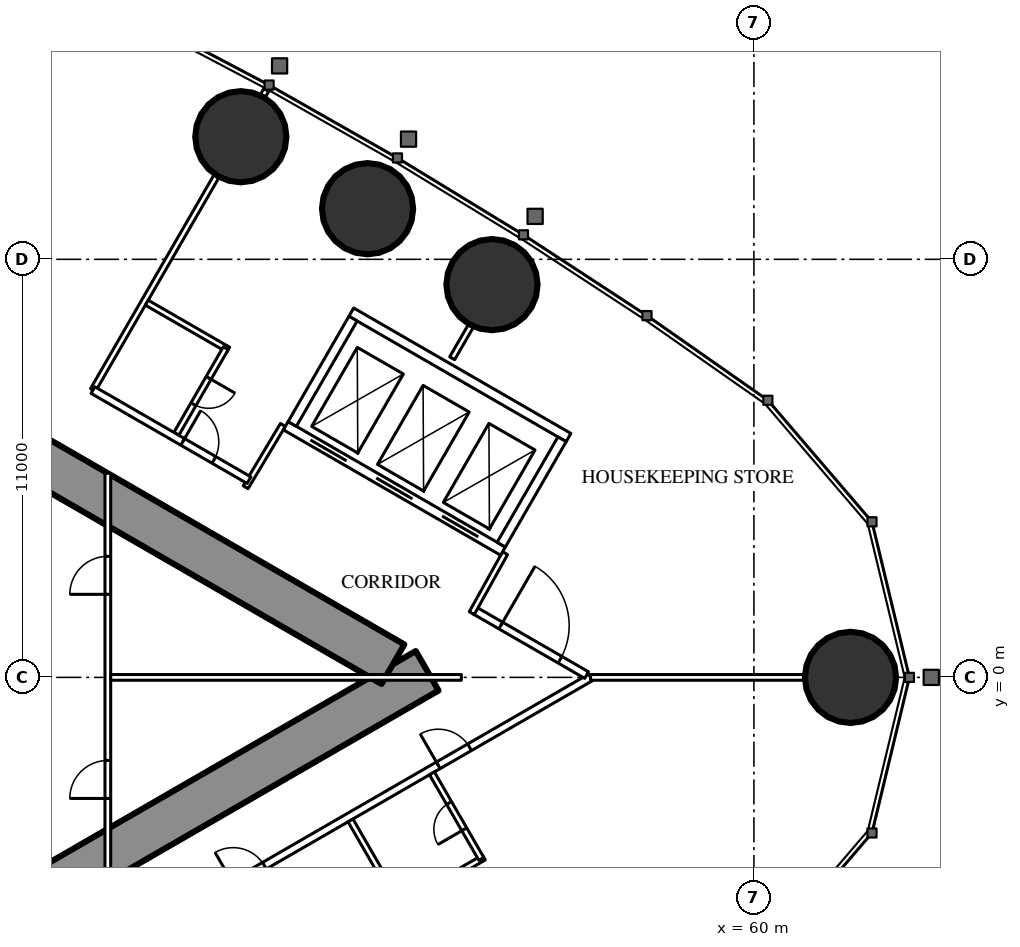
"""IFC4 building model, lengths in metres.
Left out: names, types, materials, properties, quantities, classifications, styles, units other than length and angle.
Written with IfcOpenShell. Run it as: python <this file> out.ifc"""

import sys

from ifc_helpers import new_model, si_unit, direction, frame, frame_2d, origin, origin_2d, place, context, subcontext, project, spatial, rectangle, circle, extrude, element, fill, save


model = new_model("IFC4")
c1 = context("Model", 3, precision=1e-05, world=origin(), true_north=direction((0.0, 1.0)))
c2 = subcontext(c1, "Body", "Model", "MODEL_VIEW")
j1 = project(units=[si_unit("LENGTHUNIT", "METRE"), si_unit("PLANEANGLEUNIT", "RADIAN")], contexts=[c1])
p1 = place(None, origin())
s1 = spatial("IfcSite", under=j1, at=p1, CompositionType="ELEMENT")
p2 = place(p1, origin())
s2 = spatial("IfcBuilding", under=s1, at=p2, CompositionType="ELEMENT")
p3 = place(p2, frame((0.0, 0.0, 236.9)))
s3 = spatial("IfcBuildingStorey", under=s2, at=p3, CompositionType="ELEMENT", Elevation=236.9)
for number, where, z_axis, x_axis in (
    (1, (62.542, 0.0, 0.0), (0.0, 0.0, 1.0), (1.0, 0.0, 0.0)),
    (2, (53.108, 10.334, 0.0), (0.0, 0.0, 1.0), (1.0, 0.0, 0.0)),
    (3, (49.834, 12.332, 0.0), (0.0, 0.0, 1.0), (1.0, 0.0, 0.0)),
    (4, (46.499, 14.226, 0.0), (0.0, 0.0, 1.0), (1.0, 0.0, 0.0)),
):
    element("IfcColumn", number, at=place(p3, frame(where, z_axis=z_axis, x_axis=x_axis)), inside=s3, PredefinedType="COLUMN", context=c2, shape_type="SweptSolid", body=[
        extrude(circle(Radius=1.2, at=origin_2d()), origin(), (0.0, 0.0, 1.0), 3.6),
    ])
p4 = place(p3, frame((27.2, -13.8, 0.0), z_axis=(0.0, 0.0, 1.0), x_axis=(0.866027159892, 0.499996958321, 0.0)))
e5 = element("IfcWall", 5, at=p4, inside=s3, PredefinedType="SHEAR", context=c2, shape_type="SweptSolid", body=[
    extrude(rectangle(XDim=27.947, YDim=1.2, at=frame_2d((13.973, 0.0))), origin(), (0.0, 0.0, 1.0), 3.6),
])
p5 = place(p4, frame((4.6, 0.0, 0.0)))
e6 = element("IfcOpeningElement", 6, at=p5, cuts=e5, PredefinedType="OPENING", context=c2, shape_type="SweptSolid", body=[
    extrude(rectangle(XDim=1.0, YDim=2.2, at=frame_2d((0.5, 1.1))), frame((0.0, 0.61, 0.0), z_axis=(0.0, -1.0, 0.0), x_axis=(1.0, 0.0, 0.0)), (0.0, 0.0, 1.0), 1.22),
])
p6 = place(p4, frame((13.395, 0.0, 0.0)))
e7 = element("IfcOpeningElement", 7, at=p6, cuts=e5, PredefinedType="OPENING", context=c2, shape_type="SweptSolid", body=[
    extrude(rectangle(XDim=1.8, YDim=2.2, at=frame_2d((0.9, 1.1))), frame((0.0, 0.61, 0.0), z_axis=(0.0, -1.0, 0.0), x_axis=(1.0, 0.0, 0.0)), (0.0, 0.0, 1.0), 1.22),
])
p7 = place(p3, frame((27.2, 13.8, 0.0), z_axis=(0.0, 0.0, 1.0), x_axis=(0.866024515034, -0.500001539357, 0.0)))
e8 = element("IfcWall", 8, at=p7, inside=s3, PredefinedType="SHEAR", context=c2, shape_type="SweptSolid", body=[
    extrude(rectangle(XDim=26.907, YDim=1.2, at=frame_2d((13.454, 0.0))), origin(), (0.0, 0.0, 1.0), 3.6),
])
p8 = place(p7, frame((4.6, 0.0, 0.0)))
e9 = element("IfcOpeningElement", 9, at=p8, cuts=e8, PredefinedType="OPENING", context=c2, shape_type="SweptSolid", body=[
    extrude(rectangle(XDim=1.0, YDim=2.2, at=frame_2d((0.5, 1.1))), frame((0.0, 0.61, 0.0), z_axis=(0.0, -1.0, 0.0), x_axis=(1.0, 0.0, 0.0)), (0.0, 0.0, 1.0), 1.22),
])
p9 = place(p7, frame((13.395, 0.0, 0.0)))
e10 = element("IfcOpeningElement", 10, at=p9, cuts=e8, PredefinedType="OPENING", context=c2, shape_type="SweptSolid", body=[
    extrude(rectangle(XDim=1.8, YDim=2.2, at=frame_2d((0.9, 1.1))), frame((0.0, 0.61, 0.0), z_axis=(0.0, -1.0, 0.0), x_axis=(1.0, 0.0, 0.0)), (0.0, 0.0, 1.0), 1.22),
])
p10 = place(p3, frame((28.959, -15.44, 0.0), z_axis=(0.0, 0.0, 1.0), x_axis=(0.866025227435, 0.500000305447, 0.0)))
e11 = element("IfcWall", 11, at=p10, inside=s3, PredefinedType="PARTITIONING", context=c2, shape_type="SweptSolid", body=[
    extrude(rectangle(XDim=30.88, YDim=0.2, at=frame_2d((15.44, 0.0))), origin(), (0.0, 0.0, 1.0), 3.35),
])
p11 = place(p10, frame((1.494, 0.0, 0.0)))
e12 = element("IfcOpeningElement", 12, at=p11, cuts=e11, PredefinedType="OPENING", context=c2, shape_type="SweptSolid", body=[
    extrude(rectangle(XDim=1.8, YDim=2.03, at=frame_2d((0.9, 1.015))), frame((0.0, 0.11, 0.0), z_axis=(0.0, -1.0, 0.0), x_axis=(1.0, 0.0, 0.0)), (0.0, 0.0, 1.0), 0.22),
])
p12 = place(p10, frame((7.687, 0.0, 0.0)))
e13 = element("IfcOpeningElement", 13, at=p12, cuts=e11, PredefinedType="OPENING", context=c2, shape_type="SweptSolid", body=[
    extrude(rectangle(XDim=1.0, YDim=2.2, at=frame_2d((0.5, 1.1))), frame((0.0, 0.11, 0.0), z_axis=(0.0, -1.0, 0.0), x_axis=(1.0, 0.0, 0.0)), (0.0, 0.0, 1.0), 0.22),
])
p13 = place(p10, frame((16.137, 0.0, 0.0)))
e14 = element("IfcOpeningElement", 14, at=p13, cuts=e11, PredefinedType="OPENING", context=c2, shape_type="SweptSolid", body=[
    extrude(rectangle(XDim=0.95, YDim=2.2, at=frame_2d((0.475, 1.1))), frame((0.0, 0.11, 0.0), z_axis=(0.0, -1.0, 0.0), x_axis=(1.0, 0.0, 0.0)), (0.0, 0.0, 1.0), 0.22),
])
p14 = place(p10, frame((20.021, 0.0, 0.0)))
e15 = element("IfcOpeningElement", 15, at=p14, cuts=e11, PredefinedType="OPENING", context=c2, shape_type="SweptSolid", body=[
    extrude(rectangle(XDim=0.95, YDim=2.2, at=frame_2d((0.475, 1.1))), frame((0.0, 0.11, 0.0), z_axis=(0.0, -1.0, 0.0), x_axis=(1.0, 0.0, 0.0)), (0.0, 0.0, 1.0), 0.22),
])
p15 = place(p10, frame((26.253, 0.0, 0.0)))
e16 = element("IfcOpeningElement", 16, at=p15, cuts=e11, PredefinedType="OPENING", context=c2, shape_type="SweptSolid", body=[
    extrude(rectangle(XDim=0.95, YDim=2.2, at=frame_2d((0.475, 1.1))), frame((0.0, 0.11, 0.0), z_axis=(0.0, -1.0, 0.0), x_axis=(1.0, 0.0, 0.0)), (0.0, 0.0, 1.0), 0.22),
])
p16 = place(p3, frame((49.385, -3.763, 0.0), z_axis=(0.0, 0.0, 1.0), x_axis=(0.499999447814, -0.866025722589, 0.0)))
e17 = element("IfcWall", 17, at=p16, inside=s3, PredefinedType="PARTITIONING", context=c2, shape_type="SweptSolid", body=[
    extrude(rectangle(XDim=6.333, YDim=0.15, at=frame_2d((3.166, 0.0))), origin(), (0.0, 0.0, 1.0), 2.45),
])
p17 = place(p3, frame((42.61, 7.559, 0.0), z_axis=(0.0, 0.0, 1.0), x_axis=(0.500014058812, 0.866017286774, 0.0)))
e18 = element("IfcWall", 18, at=p17, inside=s3, PredefinedType="PARTITIONING", context=c2, shape_type="SweptSolid", body=[
    extrude(rectangle(XDim=6.498, YDim=0.15, at=frame_2d((3.249, 0.0))), origin(), (0.0, 0.0, 1.0), 2.45),
])
p18 = place(p3, frame((47.079, 15.3, 0.0), z_axis=(0.0, 0.0, 1.0), x_axis=(0.499212083968, 0.866479829667, 0.0)))
e19 = element("IfcWall", 19, at=p18, inside=s3, PredefinedType="PARTITIONING", context=c2, shape_type="SweptSolid", body=[
    extrude(rectangle(XDim=0.179, YDim=0.15, at=frame_2d((0.09, 0.0))), origin(), (0.0, 0.0, 1.0), 2.45),
])
p19 = place(p3, frame((55.702, 0.0, 0.0), z_axis=(0.0, 0.0, 1.0), x_axis=(1.0, 0.0, 0.0)))
e20 = element("IfcWall", 20, at=p19, inside=s3, PredefinedType="PARTITIONING", context=c2, shape_type="SweptSolid", body=[
    extrude(rectangle(XDim=5.619, YDim=0.15, at=frame_2d((2.81, 0.0))), origin(), (0.0, 0.0, 1.0), 2.45),
])
p20 = place(p3, frame((52.06, 8.396, 0.0), z_axis=(0.0, 0.0, 1.0), x_axis=(0.500095379624, 0.865970329329, 0.0)))
e21 = element("IfcWall", 21, at=p20, inside=s3, PredefinedType="PARTITIONING", context=c2, shape_type="SweptSolid", body=[
    extrude(rectangle(XDim=0.982, YDim=0.15, at=frame_2d((0.491, 0.0))), origin(), (0.0, 0.0, 1.0), 3.35),
])
p21 = place(p3, frame((52.639, 1.769, 0.0), z_axis=(0.0, 0.0, 1.0), x_axis=(0.866027340901, -0.4999966448, 0.0)))
e22 = element("IfcWall", 22, at=p21, inside=s3, PredefinedType="PARTITIONING", context=c2, shape_type="SweptSolid", body=[
    extrude(rectangle(XDim=3.417, YDim=0.2, at=frame_2d((1.708, 0.0))), origin(), (0.0, 0.0, 1.0), 3.35),
])
p22 = place(p21, frame((0.809, 0.0, 0.0)))
e23 = element("IfcOpeningElement", 23, at=p22, cuts=e22, PredefinedType="OPENING", context=c2, shape_type="SweptSolid", body=[
    extrude(rectangle(XDim=1.8, YDim=2.2, at=frame_2d((0.9, 1.1))), frame((0.0, 0.11, 0.0), z_axis=(0.0, -1.0, 0.0), x_axis=(1.0, 0.0, 0.0)), (0.0, 0.0, 1.0), 0.22),
])
p23 = place(p3, frame((47.606, 6.642, 0.0), z_axis=(0.0, 0.0, 1.0), x_axis=(-0.51353662755, -0.858067673418, 0.0)))
e24 = element("IfcWall", 24, at=p23, inside=s3, PredefinedType="PARTITIONING", context=c2, shape_type="SweptSolid", body=[
    extrude(rectangle(XDim=1.91, YDim=0.15, at=frame_2d((0.955, 0.0))), origin(), (0.0, 0.0, 1.0), 3.35),
])
p24 = place(p3, frame((52.576, 1.689, 0.0), z_axis=(0.0, 0.0, 1.0), x_axis=(0.485424724123, 0.874278466629, 0.0)))
e25 = element("IfcWall", 25, at=p24, inside=s3, PredefinedType="PARTITIONING", context=c2, shape_type="SweptSolid", body=[
    extrude(rectangle(XDim=1.805, YDim=0.15, at=frame_2d((0.903, 0.0))), origin(), (0.0, 0.0, 1.0), 3.35),
])
p25 = place(p3, frame((50.75, -5.977, 0.0), z_axis=(0.0, 0.0, 1.0), x_axis=(0.866031185235, 0.4999899861, 0.0)))
e26 = element("IfcWall", 26, at=p25, inside=s3, PredefinedType="PARTITIONING", context=c2, shape_type="SweptSolid", body=[
    extrude(rectangle(XDim=2.475, YDim=0.15, at=frame_2d((1.238, 0.0))), origin(), (0.0, 0.0, 1.0), 3.35),
])
p26 = place(p3, frame((51.529, -2.525, 0.0), z_axis=(0.0, 0.0, 1.0), x_axis=(0.500006934395, -0.866021400173, 0.0)))
e27 = element("IfcWall", 27, at=p26, inside=s3, PredefinedType="PARTITIONING", context=c2, shape_type="SweptSolid", body=[
    extrude(rectangle(XDim=2.6, YDim=0.15, at=frame_2d((1.3, 0.0))), origin(), (0.0, 0.0, 1.0), 3.35),
])
p27 = place(p26, frame((0.9, 0.0, 0.0)))
e28 = element("IfcOpeningElement", 28, at=p27, cuts=e27, PredefinedType="OPENING", context=c2, shape_type="SweptSolid", body=[
    extrude(rectangle(XDim=0.8, YDim=2.2, at=frame_2d((0.4, 1.1))), frame((0.0, 0.085, 0.0), z_axis=(0.0, -1.0, 0.0), x_axis=(1.0, 0.0, 0.0)), (0.0, 0.0, 1.0), 0.17),
])
p28 = place(p3, frame((44.025, 9.86, 0.0), z_axis=(0.0, 0.0, 1.0), x_axis=(0.866006523861, -0.500032699561, 0.0)))
e29 = element("IfcWall", 29, at=p28, inside=s3, PredefinedType="PARTITIONING", context=c2, shape_type="SweptSolid", body=[
    extrude(rectangle(XDim=2.475, YDim=0.15, at=frame_2d((1.237, 0.0))), origin(), (0.0, 0.0, 1.0), 3.35),
])
p29 = place(p3, frame((44.803, 6.408, 0.0), z_axis=(0.0, 0.0, 1.0), x_axis=(0.500047596559, 0.865997922154, 0.0)))
e30 = element("IfcWall", 30, at=p29, inside=s3, PredefinedType="PARTITIONING", context=c2, shape_type="SweptSolid", body=[
    extrude(rectangle(XDim=2.6, YDim=0.15, at=frame_2d((1.3, 0.0))), origin(), (0.0, 0.0, 1.0), 3.35),
])
p30 = place(p29, frame((0.9, 0.0, 0.0)))
e31 = element("IfcOpeningElement", 31, at=p30, cuts=e30, PredefinedType="OPENING", context=c2, shape_type="SweptSolid", body=[
    extrude(rectangle(XDim=0.8, YDim=2.2, at=frame_2d((0.4, 1.1))), frame((0.0, 0.085, 0.0), z_axis=(0.0, -1.0, 0.0), x_axis=(1.0, 0.0, 0.0)), (0.0, 0.0, 1.0), 0.17),
])
p31 = place(p3, frame((42.61, 7.559, 0.0), z_axis=(0.0, 0.0, 1.0), x_axis=(0.866032081755, -0.499988433238, 0.0)))
e32 = element("IfcWall", 32, at=p31, inside=s3, PredefinedType="PARTITIONING", context=c2, shape_type="SweptSolid", body=[
    extrude(rectangle(XDim=4.741, YDim=0.2, at=frame_2d((2.37, 0.0))), origin(), (0.0, 0.0, 1.0), 3.35),
])
p32 = place(p31, frame((2.725, 0.0, 0.0)))
e33 = element("IfcOpeningElement", 33, at=p32, cuts=e32, PredefinedType="OPENING", context=c2, shape_type="SweptSolid", body=[
    extrude(rectangle(XDim=0.95, YDim=2.2, at=frame_2d((0.475, 1.1))), frame((0.0, 0.11, 0.0), z_axis=(0.0, -1.0, 0.0), x_axis=(1.0, 0.0, 0.0)), (0.0, 0.0, 1.0), 0.22),
])
p33 = place(p3, frame((43.0, -5.371, 0.0), z_axis=(0.0, 0.0, 1.0), x_axis=(0.0, 1.0, 0.0)))
e34 = element("IfcWall", 34, at=p33, inside=s3, PredefinedType="PARTITIONING", context=c2, shape_type="SweptSolid", body=[
    extrude(rectangle(XDim=10.741, YDim=0.15, at=frame_2d((5.371, 0.0))), origin(), (0.0, 0.0, 1.0), 3.35),
])
p34 = place(p33, frame((2.185, 0.0, 0.0)))
e35 = element("IfcOpeningElement", 35, at=p34, cuts=e34, PredefinedType="OPENING", context=c2, shape_type="SweptSolid", body=[
    extrude(rectangle(XDim=1.0, YDim=2.2, at=frame_2d((0.5, 1.1))), frame((0.0, 0.085, 0.0), z_axis=(0.0, -1.0, 0.0), x_axis=(1.0, 0.0, 0.0)), (0.0, 0.0, 1.0), 0.17),
])
p35 = place(p33, frame((7.556, 0.0, 0.0)))
e36 = element("IfcOpeningElement", 36, at=p35, cuts=e34, PredefinedType="OPENING", context=c2, shape_type="SweptSolid", body=[
    extrude(rectangle(XDim=1.0, YDim=2.2, at=frame_2d((0.5, 1.1))), frame((0.0, 0.085, 0.0), z_axis=(0.0, -1.0, 0.0), x_axis=(1.0, 0.0, 0.0)), (0.0, 0.0, 1.0), 0.17),
])
p36 = place(p3, frame((43.075, 0.0, 0.0), z_axis=(0.0, 0.0, 1.0), x_axis=(1.0, 0.0, 0.0)))
e37 = element("IfcWall", 37, at=p36, inside=s3, PredefinedType="PARTITIONING", context=c2, shape_type="SweptSolid", body=[
    extrude(rectangle(XDim=9.227, YDim=0.15, at=frame_2d((4.614, 0.0))), origin(), (0.0, 0.0, 1.0), 2.45),
])
p37 = place(p3, frame((47.681, 6.622, 0.0), z_axis=(0.0, 0.0, 1.0), x_axis=(0.86603344179, -0.499986077507, 0.0)))
e38 = element("IfcWall", 38, at=p37, inside=s3, PredefinedType="PARTITIONING", context=c2, shape_type="SweptSolid", body=[
    extrude(rectangle(XDim=6.6, YDim=0.25, at=frame_2d((3.3, 0.0))), origin(), (0.0, 0.0, 1.0), 3.35),
])
p38 = place(p37, frame((0.75, 0.0, 0.0)))
e39 = element("IfcOpeningElement", 39, at=p38, cuts=e38, PredefinedType="OPENING", context=c2, shape_type="SweptSolid", body=[
    extrude(rectangle(XDim=1.1, YDim=2.2, at=frame_2d((0.55, 1.1))), frame((0.0, 0.135, 0.0), z_axis=(0.0, -1.0, 0.0), x_axis=(1.0, 0.0, 0.0)), (0.0, 0.0, 1.0), 0.27),
])
p39 = place(p37, frame((2.75, 0.0, 0.0)))
e40 = element("IfcOpeningElement", 40, at=p39, cuts=e38, PredefinedType="OPENING", context=c2, shape_type="SweptSolid", body=[
    extrude(rectangle(XDim=1.1, YDim=2.2, at=frame_2d((0.55, 1.1))), frame((0.0, 0.135, 0.0), z_axis=(0.0, -1.0, 0.0), x_axis=(1.0, 0.0, 0.0)), (0.0, 0.0, 1.0), 0.27),
])
p40 = place(p37, frame((4.75, 0.0, 0.0)))
e41 = element("IfcOpeningElement", 41, at=p40, cuts=e38, PredefinedType="OPENING", context=c2, shape_type="SweptSolid", body=[
    extrude(rectangle(XDim=1.1, YDim=2.2, at=frame_2d((0.55, 1.1))), frame((0.0, 0.135, 0.0), z_axis=(0.0, -1.0, 0.0), x_axis=(1.0, 0.0, 0.0)), (0.0, 0.0, 1.0), 0.27),
])
p41 = place(p3, frame((49.406, 9.611, 0.0), z_axis=(0.0, 0.0, 1.0), x_axis=(0.86603344179, -0.499986077507, 0.0)))
e42 = element("IfcWall", 42, at=p41, inside=s3, PredefinedType="PARTITIONING", context=c2, shape_type="SweptSolid", body=[
    extrude(rectangle(XDim=6.6, YDim=0.25, at=frame_2d((3.3, 0.0))), origin(), (0.0, 0.0, 1.0), 3.35),
])
p42 = place(p3, frame((47.852, 6.668, 0.0), z_axis=(0.0, 0.0, 1.0), x_axis=(0.499929347863, 0.866066190972, 0.0)))
e43 = element("IfcWall", 43, at=p42, inside=s3, PredefinedType="PARTITIONING", context=c2, shape_type="SweptSolid", body=[
    extrude(rectangle(XDim=3.201, YDim=0.25, at=frame_2d((1.6, 0.0))), origin(), (0.0, 0.0, 1.0), 3.35),
])
p43 = place(p3, frame((53.352, 3.493, 0.0), z_axis=(0.0, 0.0, 1.0), x_axis=(0.499872130319, 0.866099216793, 0.0)))
e44 = element("IfcWall", 44, at=p43, inside=s3, PredefinedType="PARTITIONING", context=c2, shape_type="SweptSolid", body=[
    extrude(rectangle(XDim=3.2, YDim=0.25, at=frame_2d((1.6, 0.0))), origin(), (0.0, 0.0, 1.0), 3.35),
])
p44 = place(p14, origin())
e45 = element("IfcDoor", 45, at=p44, inside=s3, OperationType="SINGLE_SWING_LEFT", PredefinedType="DOOR", context=c2, shape_type="SweptSolid", body=[
    extrude(rectangle(XDim=0.95, YDim=2.2, at=frame_2d((0.475, 1.1))), frame((0.0, 0.025, 0.0), z_axis=(0.0, -1.0, 0.0), x_axis=(1.0, 0.0, 0.0)), (0.0, 0.0, 1.0), 0.05),
])
fill(e15, e45)
p45 = place(p27, origin())
e46 = element("IfcDoor", 46, at=p45, inside=s3, OperationType="SINGLE_SWING_RIGHT", PredefinedType="DOOR", context=c2, shape_type="SweptSolid", body=[
    extrude(rectangle(XDim=0.8, YDim=2.2, at=frame_2d((0.4, 1.1))), frame((0.0, 0.025, 0.0), z_axis=(0.0, -1.0, 0.0), x_axis=(1.0, 0.0, 0.0)), (0.0, 0.0, 1.0), 0.05),
])
fill(e28, e46)
p46 = place(p15, origin())
e47 = element("IfcDoor", 47, at=p46, inside=s3, OperationType="SINGLE_SWING_LEFT", PredefinedType="DOOR", context=c2, shape_type="SweptSolid", body=[
    extrude(rectangle(XDim=0.95, YDim=2.2, at=frame_2d((0.475, 1.1))), frame((0.0, 0.025, 0.0), z_axis=(0.0, -1.0, 0.0), x_axis=(1.0, 0.0, 0.0)), (0.0, 0.0, 1.0), 0.05),
])
fill(e16, e47)
p47 = place(p30, origin())
e48 = element("IfcDoor", 48, at=p47, inside=s3, OperationType="SINGLE_SWING_RIGHT", PredefinedType="DOOR", context=c2, shape_type="SweptSolid", body=[
    extrude(rectangle(XDim=0.8, YDim=2.2, at=frame_2d((0.4, 1.1))), frame((0.0, 0.025, 0.0), z_axis=(0.0, -1.0, 0.0), x_axis=(1.0, 0.0, 0.0)), (0.0, 0.0, 1.0), 0.05),
])
fill(e31, e48)
p48 = place(p32, origin())
e49 = element("IfcDoor", 49, at=p48, inside=s3, OperationType="SINGLE_SWING_LEFT", PredefinedType="DOOR", context=c2, shape_type="SweptSolid", body=[
    extrude(rectangle(XDim=0.95, YDim=2.2, at=frame_2d((0.475, 1.1))), frame((0.0, 0.025, 0.0), z_axis=(0.0, -1.0, 0.0), x_axis=(1.0, 0.0, 0.0)), (0.0, 0.0, 1.0), 0.05),
])
fill(e33, e49)
p49 = place(p22, origin())
e50 = element("IfcDoor", 50, at=p49, inside=s3, OperationType="DOUBLE_DOOR_SINGLE_SWING", PredefinedType="DOOR", context=c2, shape_type="SweptSolid", body=[
    extrude(rectangle(XDim=1.8, YDim=2.2, at=frame_2d((0.9, 1.1))), frame((0.0, 0.025, 0.0), z_axis=(0.0, -1.0, 0.0), x_axis=(1.0, 0.0, 0.0)), (0.0, 0.0, 1.0), 0.05),
])
fill(e23, e50)
p50 = place(p34, origin())
e51 = element("IfcDoor", 51, at=p50, inside=s3, OperationType="SINGLE_SWING_LEFT", PredefinedType="DOOR", context=c2, shape_type="SweptSolid", body=[
    extrude(rectangle(XDim=1.0, YDim=2.2, at=frame_2d((0.5, 1.1))), frame((0.0, 0.025, 0.0), z_axis=(0.0, -1.0, 0.0), x_axis=(1.0, 0.0, 0.0)), (0.0, 0.0, 1.0), 0.05),
])
fill(e35, e51)
p51 = place(p35, origin())
e52 = element("IfcDoor", 52, at=p51, inside=s3, OperationType="SINGLE_SWING_LEFT", PredefinedType="DOOR", context=c2, shape_type="SweptSolid", body=[
    extrude(rectangle(XDim=1.0, YDim=2.2, at=frame_2d((0.5, 1.1))), frame((0.0, 0.025, 0.0), z_axis=(0.0, -1.0, 0.0), x_axis=(1.0, 0.0, 0.0)), (0.0, 0.0, 1.0), 0.05),
])
fill(e36, e52)
p52 = place(p38, origin())
e53 = element("IfcDoor", 53, at=p52, inside=s3, OperationType="DOUBLE_DOOR_SLIDING", PredefinedType="USERDEFINED", context=c2, shape_type="SweptSolid", body=[
    extrude(rectangle(XDim=1.1, YDim=2.2, at=frame_2d((0.55, 1.1))), frame((0.0, 0.025, 0.0), z_axis=(0.0, -1.0, 0.0), x_axis=(1.0, 0.0, 0.0)), (0.0, 0.0, 1.0), 0.05),
])
fill(e39, e53)
p53 = place(p39, origin())
e54 = element("IfcDoor", 54, at=p53, inside=s3, OperationType="DOUBLE_DOOR_SLIDING", PredefinedType="USERDEFINED", context=c2, shape_type="SweptSolid", body=[
    extrude(rectangle(XDim=1.1, YDim=2.2, at=frame_2d((0.55, 1.1))), frame((0.0, 0.025, 0.0), z_axis=(0.0, -1.0, 0.0), x_axis=(1.0, 0.0, 0.0)), (0.0, 0.0, 1.0), 0.05),
])
fill(e40, e54)
p54 = place(p40, origin())
e55 = element("IfcDoor", 55, at=p54, inside=s3, OperationType="DOUBLE_DOOR_SLIDING", PredefinedType="USERDEFINED", context=c2, shape_type="SweptSolid", body=[
    extrude(rectangle(XDim=1.1, YDim=2.2, at=frame_2d((0.55, 1.1))), frame((0.0, 0.025, 0.0), z_axis=(0.0, -1.0, 0.0), x_axis=(1.0, 0.0, 0.0)), (0.0, 0.0, 1.0), 0.05),
])
fill(e41, e55)
save(model, sys.argv[1])
